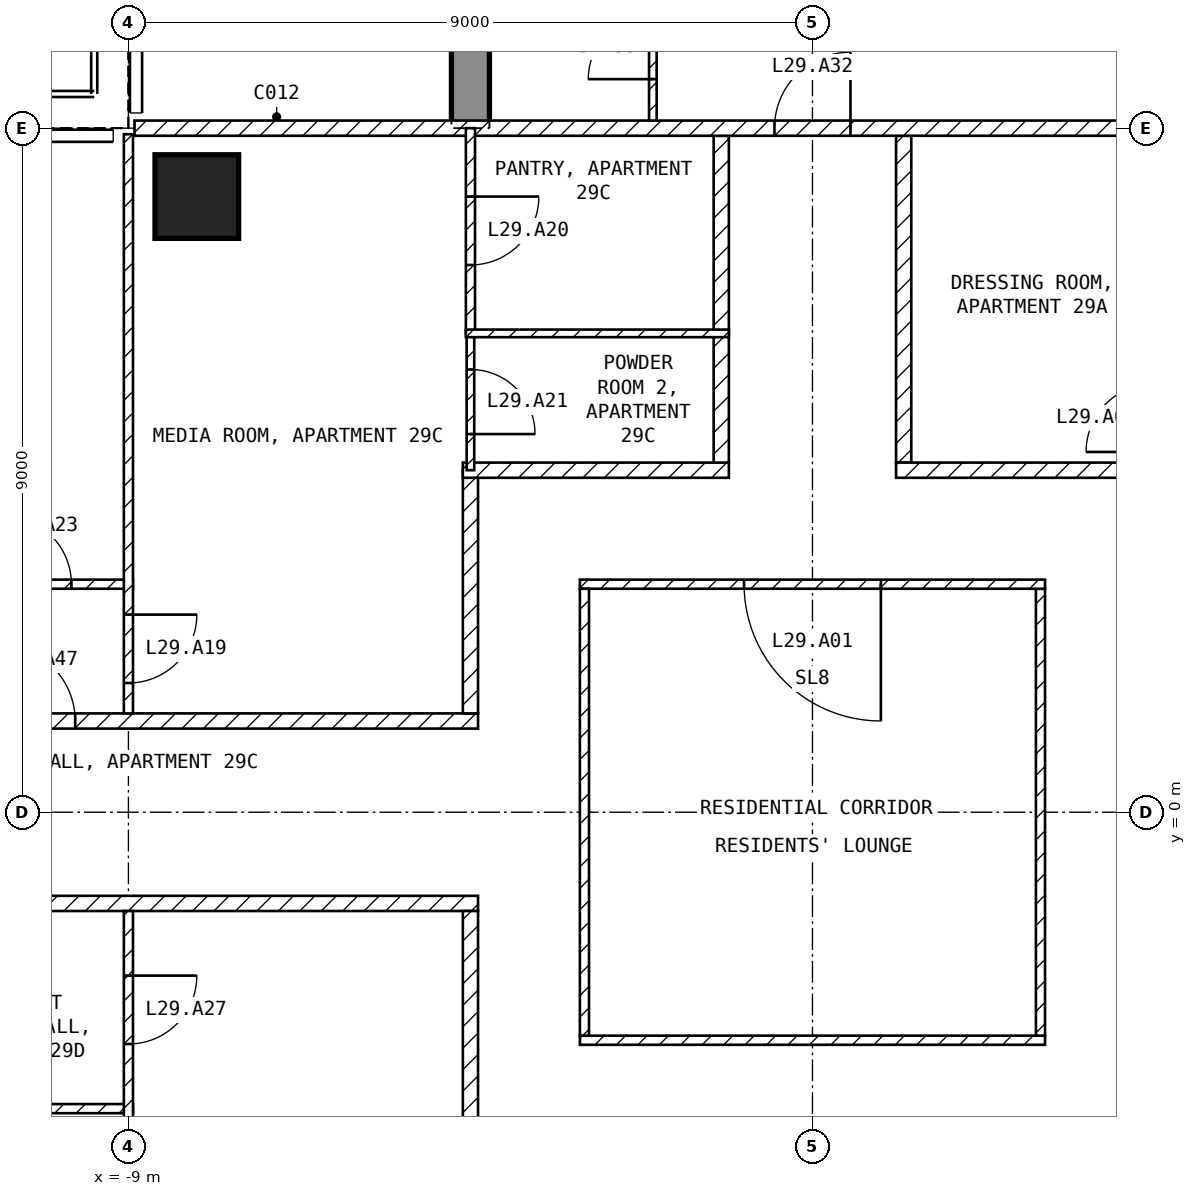
"""IFC4 building model, lengths in metres.
Left out: names, types, materials, properties, quantities, classifications, styles, units other than length and angle.
Written with IfcOpenShell. Run it as: python <this file> out.ifc"""

import sys

from ifc_helpers import new_model, si_unit, direction, frame, frame_2d, origin, origin_2d, place, context, subcontext, project, spatial, polyline, rectangle, outline, extrude, element, fill, save


model = new_model("IFC4")
c1 = context("Model", 3, precision=1e-05, world=origin(), true_north=direction((0.0, 1.0)))
c2 = subcontext(c1, "Body", "Model", "MODEL_VIEW")
j1 = project(units=[si_unit("LENGTHUNIT", "METRE"), si_unit("PLANEANGLEUNIT", "RADIAN")], contexts=[c1])
p1 = place(None, origin())
s1 = spatial("IfcSite", under=j1, at=p1, CompositionType="ELEMENT")
p2 = place(p1, origin())
s2 = spatial("IfcBuilding", under=s1, at=p2, CompositionType="ELEMENT")
p3 = place(p2, frame((0.0, 0.0, 123.4)))
s3 = spatial("IfcBuildingStorey", under=s2, at=p3, CompositionType="ELEMENT", Elevation=123.4)
p4 = place(p3, frame((-8.1, 8.1, -0.25), z_axis=(0.0, 0.0, 1.0), x_axis=(1.0, 0.0, 0.0)))
e1 = element("IfcColumn", 1, at=p4, inside=s3, PredefinedType="COLUMN", context=c2, shape_type="SweptSolid", body=[
    extrude(rectangle(XDim=1.1, YDim=1.1, at=origin_2d()), origin(), (0.0, 0.0, 1.0), 3.5),
])
p5 = place(p3, frame((-4.75, 9.0, -0.25), z_axis=(1.0, 0.0, 0.0), x_axis=(0.0, 1.0, 0.0)))
e2 = element("IfcWall", 2, at=p5, inside=s3, PredefinedType="SHEAR", context=c2, shape_type="SweptSolid", body=[
    extrude(outline(polyline([(0.0, 0.0), (2.1, 0.0), (2.1, 2.65), (4.5, 2.65), (4.5, 0.0), (9.9, 0.0), (9.9, 2.65), (12.3, 2.65), (12.3, 0.0), (16.55, 0.0), (16.55, 3.5), (0.0, 3.5), (0.0, 0.0)])), origin(), (0.0, 0.0, 1.0), 0.5),
])
p6 = place(p3, frame((-3.06, -3.0, 0.0), z_axis=(0.0, 0.0, 1.0), x_axis=(1.0, 0.0, 0.0)))
e3 = element("IfcWall", 3, at=p6, inside=s3, PredefinedType="PARTITIONING", context=c2, shape_type="SweptSolid", body=[
    extrude(rectangle(XDim=6.12, YDim=0.12, at=frame_2d((3.06, 0.0))), origin(), (0.0, 0.0, 1.0), 3.25),
])
p7 = place(p3, frame((3.0, -2.94, 0.0), z_axis=(0.0, 0.0, 1.0), x_axis=(0.0, 1.0, 0.0)))
e4 = element("IfcWall", 4, at=p7, inside=s3, PredefinedType="PARTITIONING", context=c2, shape_type="SweptSolid", body=[
    extrude(rectangle(XDim=5.88, YDim=0.12, at=frame_2d((2.94, 0.0))), origin(), (0.0, 0.0, 1.0), 3.25),
])
p8 = place(p3, frame((3.06, 3.0, 0.0), z_axis=(0.0, 0.0, 1.0), x_axis=(-1.0, 0.0, 0.0)))
e5 = element("IfcWall", 5, at=p8, inside=s3, PredefinedType="PARTITIONING", context=c2, shape_type="SweptSolid", body=[
    extrude(rectangle(XDim=6.12, YDim=0.12, at=frame_2d((3.06, 0.0))), origin(), (0.0, 0.0, 1.0), 3.25),
])
p9 = place(p8, frame((2.16, 0.0, 0.0)))
e6 = element("IfcOpeningElement", 6, at=p9, cuts=e5, PredefinedType="OPENING", context=c2, shape_type="SweptSolid", body=[
    extrude(rectangle(XDim=1.8, YDim=2.1, at=frame_2d((0.9, 1.05))), frame((0.0, 0.07, 0.0), z_axis=(0.0, -1.0, 0.0), x_axis=(1.0, 0.0, 0.0)), (0.0, 0.0, 1.0), 0.14),
])
p10 = place(p3, frame((-3.0, 2.94, 0.0), z_axis=(0.0, 0.0, 1.0), x_axis=(0.0, -1.0, 0.0)))
e7 = element("IfcWall", 7, at=p10, inside=s3, PredefinedType="PARTITIONING", context=c2, shape_type="SweptSolid", body=[
    extrude(rectangle(XDim=5.88, YDim=0.12, at=frame_2d((2.94, 0.0))), origin(), (0.0, 0.0, 1.0), 3.25),
])
p11 = place(p3, frame((1.2, 8.9, 0.0), z_axis=(0.0, 0.0, 1.0), x_axis=(0.0, -1.0, 0.0)))
e8 = element("IfcWall", 8, at=p11, inside=s3, PredefinedType="PARTITIONING", context=c2, shape_type="SweptSolid", body=[
    extrude(rectangle(XDim=4.3, YDim=0.2, at=frame_2d((2.15, 0.0))), origin(), (0.0, 0.0, 1.0), 3.25),
])
p12 = place(p3, frame((1.1, 4.5, 0.0), z_axis=(0.0, 0.0, 1.0), x_axis=(1.0, 0.0, 0.0)))
e9 = element("IfcWall", 9, at=p12, inside=s3, PredefinedType="PARTITIONING", context=c2, shape_type="SweptSolid", body=[
    extrude(rectangle(XDim=3.5, YDim=0.2, at=frame_2d((1.75, 0.0))), origin(), (0.0, 0.0, 1.0), 3.25),
])
p13 = place(p3, frame((-21.6, 1.2, 0.0), z_axis=(0.0, 0.0, 1.0), x_axis=(1.0, 0.0, 0.0)))
e10 = element("IfcWall", 10, at=p13, inside=s3, PredefinedType="PARTITIONING", context=c2, shape_type="SweptSolid", body=[
    extrude(rectangle(XDim=17.2, YDim=0.2, at=frame_2d((8.6, 0.0))), origin(), (0.0, 0.0, 1.0), 3.25),
])
p14 = place(p13, frame((10.9, 0.0, 0.0)))
e11 = element("IfcOpeningElement", 11, at=p14, cuts=e10, PredefinedType="OPENING", context=c2, shape_type="SweptSolid", body=[
    extrude(rectangle(XDim=1.0, YDim=2.1, at=frame_2d((0.5, 1.05))), frame((0.0, 0.11, 0.0), z_axis=(0.0, -1.0, 0.0), x_axis=(1.0, 0.0, 0.0)), (0.0, 0.0, 1.0), 0.22),
])
p15 = place(p3, frame((-4.5, 1.3, 0.0), z_axis=(0.0, 0.0, 1.0), x_axis=(0.0, 1.0, 0.0)))
e12 = element("IfcWall", 12, at=p15, inside=s3, PredefinedType="PARTITIONING", context=c2, shape_type="SweptSolid", body=[
    extrude(rectangle(XDim=3.2, YDim=0.2, at=frame_2d((1.6, 0.0))), origin(), (0.0, 0.0, 1.0), 3.25),
])
p16 = place(p3, frame((-4.6, 4.5, 0.0), z_axis=(0.0, 0.0, 1.0), x_axis=(1.0, 0.0, 0.0)))
e13 = element("IfcWall", 13, at=p16, inside=s3, PredefinedType="PARTITIONING", context=c2, shape_type="SweptSolid", body=[
    extrude(rectangle(XDim=3.5, YDim=0.2, at=frame_2d((1.75, 0.0))), origin(), (0.0, 0.0, 1.0), 3.25),
])
p17 = place(p3, frame((-1.2, 4.6, 0.0), z_axis=(0.0, 0.0, 1.0), x_axis=(0.0, 1.0, 0.0)))
e14 = element("IfcWall", 14, at=p17, inside=s3, PredefinedType="PARTITIONING", context=c2, shape_type="SweptSolid", body=[
    extrude(rectangle(XDim=4.3, YDim=0.2, at=frame_2d((2.15, 0.0))), origin(), (0.0, 0.0, 1.0), 3.25),
])
p18 = place(p3, frame((-4.4, -1.2, 0.0), z_axis=(0.0, 0.0, 1.0), x_axis=(-1.0, 0.0, 0.0)))
e15 = element("IfcWall", 15, at=p18, inside=s3, PredefinedType="PARTITIONING", context=c2, shape_type="SweptSolid", body=[
    extrude(rectangle(XDim=17.2, YDim=0.2, at=frame_2d((8.6, 0.0))), origin(), (0.0, 0.0, 1.0), 3.25),
])
p19 = place(p18, frame((5.675, 0.0, 0.0)))
e16 = element("IfcOpeningElement", 16, at=p19, cuts=e15, PredefinedType="OPENING", context=c2, shape_type="SweptSolid", body=[
    extrude(rectangle(XDim=1.0, YDim=2.1, at=frame_2d((0.5, 1.05))), frame((0.0, 0.11, 0.0), z_axis=(0.0, -1.0, 0.0), x_axis=(1.0, 0.0, 0.0)), (0.0, 0.0, 1.0), 0.22),
])
p20 = place(p3, frame((-4.5, -4.5, 0.0), z_axis=(0.0, 0.0, 1.0), x_axis=(0.0, 1.0, 0.0)))
e17 = element("IfcWall", 17, at=p20, inside=s3, PredefinedType="PARTITIONING", context=c2, shape_type="SweptSolid", body=[
    extrude(rectangle(XDim=3.2, YDim=0.2, at=frame_2d((1.6, 0.0))), origin(), (0.0, 0.0, 1.0), 3.25),
])
p21 = place(p3, frame((-8.92, 9.0, 0.0), z_axis=(0.0, 0.0, 1.0), x_axis=(1.0, 0.0, 0.0)))
e18 = element("IfcWall", 18, at=p21, inside=s3, PredefinedType="PARTITIONING", context=c2, shape_type="SweptSolid", body=[
    extrude(rectangle(XDim=17.84, YDim=0.2, at=frame_2d((8.92, 0.0))), origin(), (0.0, 0.0, 1.0), 3.25),
])
p22 = place(p21, frame((8.42, 0.0, 0.0)))
e19 = element("IfcOpeningElement", 19, at=p22, cuts=e18, PredefinedType="OPENING", context=c2, shape_type="SweptSolid", body=[
    extrude(rectangle(XDim=1.0, YDim=2.1, at=frame_2d((0.5, 1.05))), frame((0.0, 0.11, 0.0), z_axis=(0.0, -1.0, 0.0), x_axis=(1.0, 0.0, 0.0)), (0.0, 0.0, 1.0), 0.22),
])
p23 = place(p3, frame((-14.4, 3.0, 0.0), z_axis=(0.0, 0.0, 1.0), x_axis=(1.0, 0.0, 0.0)))
e20 = element("IfcWall", 20, at=p23, inside=s3, PredefinedType="PARTITIONING", context=c2, shape_type="SweptSolid", body=[
    extrude(rectangle(XDim=5.46, YDim=0.12, at=frame_2d((2.73, 0.0))), origin(), (0.0, 0.0, 1.0), 3.25),
])
p24 = place(p23, frame((3.75, 0.0, 0.0)))
e21 = element("IfcOpeningElement", 21, at=p24, cuts=e20, PredefinedType="OPENING", context=c2, shape_type="SweptSolid", body=[
    extrude(rectangle(XDim=0.9, YDim=2.1, at=frame_2d((0.45, 1.05))), frame((0.0, 0.07, 0.0), z_axis=(0.0, -1.0, 0.0), x_axis=(1.0, 0.0, 0.0)), (0.0, 0.0, 1.0), 0.14),
])
p25 = place(p3, frame((-9.0, 8.92, 0.0), z_axis=(0.0, 0.0, 1.0), x_axis=(0.0, -1.0, 0.0)))
e22 = element("IfcWall", 22, at=p25, inside=s3, PredefinedType="PARTITIONING", context=c2, shape_type="SweptSolid", body=[
    extrude(rectangle(XDim=7.62, YDim=0.12, at=frame_2d((3.81, 0.0))), origin(), (0.0, 0.0, 1.0), 3.25),
])
p26 = place(p25, frame((6.32, 0.0, 0.0)))
e23 = element("IfcOpeningElement", 23, at=p26, cuts=e22, PredefinedType="OPENING", context=c2, shape_type="SweptSolid", body=[
    extrude(rectangle(XDim=0.9, YDim=2.1, at=frame_2d((0.45, 1.05))), frame((0.0, 0.07, 0.0), z_axis=(0.0, -1.0, 0.0), x_axis=(1.0, 0.0, 0.0)), (0.0, 0.0, 1.0), 0.14),
])
p27 = place(p3, frame((-4.5, 6.3, 0.0), z_axis=(0.0, 0.0, 1.0), x_axis=(0.0, -1.0, 0.0)))
e24 = element("IfcWall", 24, at=p27, inside=s3, PredefinedType="PARTITIONING", context=c2, shape_type="SweptSolid", body=[
    extrude(rectangle(XDim=1.8, YDim=0.1, at=frame_2d((0.9, 0.0))), origin(), (0.0, 0.0, 1.0), 3.25),
])
p28 = place(p27, frame((0.475, 0.0, 0.0)))
e25 = element("IfcOpeningElement", 25, at=p28, cuts=e24, PredefinedType="OPENING", context=c2, shape_type="SweptSolid", body=[
    extrude(rectangle(XDim=0.85, YDim=2.1, at=frame_2d((0.425, 1.05))), frame((0.0, 0.06, 0.0), z_axis=(0.0, -1.0, 0.0), x_axis=(1.0, 0.0, 0.0)), (0.0, 0.0, 1.0), 0.12),
])
p29 = place(p3, frame((-4.5, 9.0, 0.0), z_axis=(0.0, 0.0, 1.0), x_axis=(0.0, -1.0, 0.0)))
e26 = element("IfcWall", 26, at=p29, inside=s3, PredefinedType="PARTITIONING", context=c2, shape_type="SweptSolid", body=[
    extrude(rectangle(XDim=2.7, YDim=0.12, at=frame_2d((1.35, 0.0))), origin(), (0.0, 0.0, 1.0), 3.25),
])
p30 = place(p29, frame((0.9, 0.0, 0.0)))
e27 = element("IfcOpeningElement", 27, at=p30, cuts=e26, PredefinedType="OPENING", context=c2, shape_type="SweptSolid", body=[
    extrude(rectangle(XDim=0.9, YDim=2.1, at=frame_2d((0.45, 1.05))), frame((0.0, 0.07, 0.0), z_axis=(0.0, -1.0, 0.0), x_axis=(1.0, 0.0, 0.0)), (0.0, 0.0, 1.0), 0.14),
])
p31 = place(p3, frame((-4.56, 6.3, 0.0), z_axis=(0.0, 0.0, 1.0), x_axis=(1.0, 0.0, 0.0)))
e28 = element("IfcWall", 28, at=p31, inside=s3, PredefinedType="PARTITIONING", context=c2, shape_type="SweptSolid", body=[
    extrude(rectangle(XDim=3.46, YDim=0.1, at=frame_2d((1.73, 0.0))), origin(), (0.0, 0.0, 1.0), 3.25),
])
p32 = place(p3, frame((-8.94, -3.9, 0.0), z_axis=(0.0, 0.0, 1.0), x_axis=(-1.0, 0.0, 0.0)))
e29 = element("IfcWall", 29, at=p32, inside=s3, PredefinedType="PARTITIONING", context=c2, shape_type="SweptSolid", body=[
    extrude(rectangle(XDim=3.21, YDim=0.12, at=frame_2d((1.605, 0.0))), origin(), (0.0, 0.0, 1.0), 3.25),
])
p33 = place(p32, frame((1.185, 0.0, 0.0)))
e30 = element("IfcOpeningElement", 30, at=p33, cuts=e29, PredefinedType="OPENING", context=c2, shape_type="SweptSolid", body=[
    extrude(rectangle(XDim=0.9, YDim=2.1, at=frame_2d((0.45, 1.05))), frame((0.0, 0.07, 0.0), z_axis=(0.0, -1.0, 0.0), x_axis=(1.0, 0.0, 0.0)), (0.0, 0.0, 1.0), 0.14),
])
p34 = place(p3, frame((-9.0, -1.3, 0.0), z_axis=(0.0, 0.0, 1.0), x_axis=(0.0, -1.0, 0.0)))
e31 = element("IfcWall", 31, at=p34, inside=s3, PredefinedType="PARTITIONING", context=c2, shape_type="SweptSolid", body=[
    extrude(rectangle(XDim=7.62, YDim=0.12, at=frame_2d((3.81, 0.0))), origin(), (0.0, 0.0, 1.0), 3.25),
])
p35 = place(p34, frame((0.85, 0.0, 0.0)))
e32 = element("IfcOpeningElement", 32, at=p35, cuts=e31, PredefinedType="OPENING", context=c2, shape_type="SweptSolid", body=[
    extrude(rectangle(XDim=0.9, YDim=2.1, at=frame_2d((0.45, 1.05))), frame((0.0, 0.07, 0.0), z_axis=(0.0, -1.0, 0.0), x_axis=(1.0, 0.0, 0.0)), (0.0, 0.0, 1.0), 0.14),
])
p36 = place(p3, frame((-2.1, 9.1, 0.0), z_axis=(0.0, 0.0, 1.0), x_axis=(0.0, 1.0, 0.0)))
e33 = element("IfcWall", 33, at=p36, inside=s3, PredefinedType="PARTITIONING", context=c2, shape_type="SweptSolid", body=[
    extrude(rectangle(XDim=1.94, YDim=0.1, at=frame_2d((0.97, 0.0))), origin(), (0.0, 0.0, 1.0), 3.25),
])
p37 = place(p36, frame((0.545, 0.0, 0.0)))
e34 = element("IfcOpeningElement", 34, at=p37, cuts=e33, PredefinedType="OPENING", context=c2, shape_type="SweptSolid", body=[
    extrude(rectangle(XDim=0.85, YDim=2.1, at=frame_2d((0.425, 1.05))), frame((0.0, 0.06, 0.0), z_axis=(0.0, -1.0, 0.0), x_axis=(1.0, 0.0, 0.0)), (0.0, 0.0, 1.0), 0.12),
])
p38 = place(p9, origin())
e35 = element("IfcDoor", 35, at=p38, inside=s3, OperationType="SINGLE_SWING_LEFT", PredefinedType="DOOR", context=c2, shape_type="SweptSolid", body=[
    extrude(rectangle(XDim=1.8, YDim=2.1, at=frame_2d((0.9, 1.05))), frame((0.0, 0.025, 0.0), z_axis=(0.0, -1.0, 0.0), x_axis=(1.0, 0.0, 0.0)), (0.0, 0.0, 1.0), 0.05),
])
fill(e6, e35)
p39 = place(p26, origin())
e36 = element("IfcDoor", 36, at=p39, inside=s3, OperationType="SINGLE_SWING_LEFT", PredefinedType="DOOR", context=c2, shape_type="SweptSolid", body=[
    extrude(rectangle(XDim=0.9, YDim=2.1, at=frame_2d((0.45, 1.05))), frame((0.0, 0.025, 0.0), z_axis=(0.0, -1.0, 0.0), x_axis=(1.0, 0.0, 0.0)), (0.0, 0.0, 1.0), 0.05),
])
fill(e23, e36)
p40 = place(p30, origin())
e37 = element("IfcDoor", 37, at=p40, inside=s3, OperationType="SINGLE_SWING_LEFT", PredefinedType="DOOR", context=c2, shape_type="SweptSolid", body=[
    extrude(rectangle(XDim=0.9, YDim=2.1, at=frame_2d((0.45, 1.05))), frame((0.0, 0.025, 0.0), z_axis=(0.0, -1.0, 0.0), x_axis=(1.0, 0.0, 0.0)), (0.0, 0.0, 1.0), 0.05),
])
fill(e27, e37)
p41 = place(p28, origin())
e38 = element("IfcDoor", 38, at=p41, inside=s3, OperationType="SINGLE_SWING_RIGHT", PredefinedType="DOOR", context=c2, shape_type="SweptSolid", body=[
    extrude(rectangle(XDim=0.85, YDim=2.1, at=frame_2d((0.425, 1.05))), frame((0.0, 0.025, 0.0), z_axis=(0.0, -1.0, 0.0), x_axis=(1.0, 0.0, 0.0)), (0.0, 0.0, 1.0), 0.05),
])
fill(e25, e38)
p42 = place(p24, origin())
e39 = element("IfcDoor", 39, at=p42, inside=s3, OperationType="SINGLE_SWING_LEFT", PredefinedType="DOOR", context=c2, shape_type="SweptSolid", body=[
    extrude(rectangle(XDim=0.9, YDim=2.1, at=frame_2d((0.45, 1.05))), frame((0.0, 0.025, 0.0), z_axis=(0.0, -1.0, 0.0), x_axis=(1.0, 0.0, 0.0)), (0.0, 0.0, 1.0), 0.05),
])
fill(e21, e39)
p43 = place(p35, origin())
e40 = element("IfcDoor", 40, at=p43, inside=s3, OperationType="SINGLE_SWING_LEFT", PredefinedType="DOOR", context=c2, shape_type="SweptSolid", body=[
    extrude(rectangle(XDim=0.9, YDim=2.1, at=frame_2d((0.45, 1.05))), frame((0.0, 0.025, 0.0), z_axis=(0.0, -1.0, 0.0), x_axis=(1.0, 0.0, 0.0)), (0.0, 0.0, 1.0), 0.05),
])
fill(e32, e40)
p44 = place(p22, origin())
e41 = element("IfcDoor", 41, at=p44, inside=s3, OperationType="SINGLE_SWING_RIGHT", PredefinedType="DOOR", context=c2, shape_type="SweptSolid", body=[
    extrude(rectangle(XDim=1.0, YDim=2.1, at=frame_2d((0.5, 1.05))), frame((0.0, 0.025, 0.0), z_axis=(0.0, -1.0, 0.0), x_axis=(1.0, 0.0, 0.0)), (0.0, 0.0, 1.0), 0.05),
])
fill(e19, e41)
p45 = place(p37, origin())
e42 = element("IfcDoor", 42, at=p45, inside=s3, OperationType="SINGLE_SWING_LEFT", PredefinedType="DOOR", context=c2, shape_type="SweptSolid", body=[
    extrude(rectangle(XDim=0.85, YDim=2.1, at=frame_2d((0.425, 1.05))), frame((0.0, 0.025, 0.0), z_axis=(0.0, -1.0, 0.0), x_axis=(1.0, 0.0, 0.0)), (0.0, 0.0, 1.0), 0.05),
])
fill(e34, e42)
p46 = place(p14, origin())
e43 = element("IfcDoor", 43, at=p46, inside=s3, OperationType="SINGLE_SWING_LEFT", PredefinedType="DOOR", context=c2, shape_type="SweptSolid", body=[
    extrude(rectangle(XDim=1.0, YDim=2.1, at=frame_2d((0.5, 1.05))), frame((0.0, 0.025, 0.0), z_axis=(0.0, -1.0, 0.0), x_axis=(1.0, 0.0, 0.0)), (0.0, 0.0, 1.0), 0.05),
])
fill(e11, e43)
save(model, sys.argv[1])
